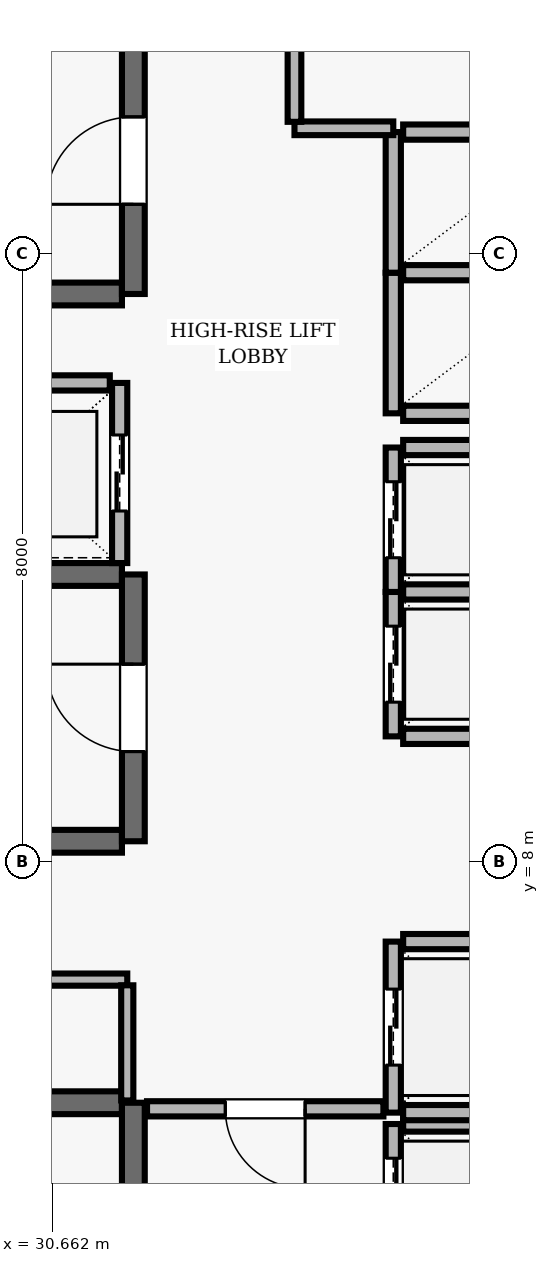
"""IFC4 building model, lengths in metres.
Left out: names, types, materials, properties, quantities, classifications, styles, units other than length and angle.
Written with IfcOpenShell. Run it as: python <this file> out.ifc"""

import sys

from ifc_helpers import new_model, si_unit, direction, frame, frame_2d, origin, place, context, subcontext, project, spatial, rectangle, extrude, element, fill, save


model = new_model("IFC4")
c1 = context("Model", 3, precision=1e-05, world=origin(), true_north=direction((0.0, 1.0)))
c2 = subcontext(c1, "Body", "Model", "MODEL_VIEW")
j1 = project(units=[si_unit("LENGTHUNIT", "METRE"), si_unit("PLANEANGLEUNIT", "RADIAN")], contexts=[c1])
p1 = place(None, origin())
s1 = spatial("IfcSite", under=j1, at=p1, CompositionType="ELEMENT")
p2 = place(p1, origin())
s2 = spatial("IfcBuilding", under=s1, at=p2, CompositionType="ELEMENT")
p3 = place(p2, frame((0.0, 0.0, 302.8)))
s3 = spatial("IfcBuildingStorey", under=s2, at=p3, CompositionType="ELEMENT", Elevation=302.8)
p4 = place(p3, frame((31.58, 4.83, 0.0), z_axis=(0.0, 0.0, 1.0), x_axis=(-1.0, 0.0, 0.0)))
e1 = element("IfcWall", 1, at=p4, inside=s3, PredefinedType="SHEAR", context=c2, shape_type="SweptSolid", body=[
    extrude(rectangle(XDim=8.36, YDim=0.3, at=frame_2d((4.18, 0.0))), origin(), (0.0, 0.0, 1.0), 3.64),
])
p5 = place(p3, frame((31.73, 0.96, 0.0), z_axis=(0.0, 0.0, 1.0), x_axis=(0.0, 1.0, 0.0)))
e2 = element("IfcWall", 2, at=p5, inside=s3, PredefinedType="SHEAR", context=c2, shape_type="SweptSolid", body=[
    extrude(rectangle(XDim=3.87, YDim=0.3, at=frame_2d((1.935, 0.0))), origin(), (0.0, 0.0, 1.0), 3.64),
])
p6 = place(p5, frame((1.54, 0.0, 0.0)))
e3 = element("IfcOpeningElement", 3, at=p6, cuts=e2, PredefinedType="OPENING", context=c2, shape_type="SweptSolid", body=[
    extrude(rectangle(XDim=1.15, YDim=2.15, at=frame_2d((0.575, 1.075))), frame((0.0, 0.16, 0.0), z_axis=(0.0, -1.0, 0.0), x_axis=(1.0, 0.0, 0.0)), (0.0, 0.0, 1.0), 0.32),
])
p7 = place(p3, frame((23.22, 15.47, 0.0), z_axis=(0.0, 0.0, 1.0), x_axis=(1.0, 0.0, 0.0)))
e4 = element("IfcWall", 4, at=p7, inside=s3, PredefinedType="SHEAR", context=c2, shape_type="SweptSolid", body=[
    extrude(rectangle(XDim=8.36, YDim=0.3, at=frame_2d((4.18, 0.0))), origin(), (0.0, 0.0, 1.0), 3.64),
])
p8 = place(p3, frame((31.73, 15.47, 0.0), z_axis=(0.0, 0.0, 1.0), x_axis=(0.0, 1.0, 0.0)))
e5 = element("IfcWall", 5, at=p8, inside=s3, PredefinedType="SHEAR", context=c2, shape_type="SweptSolid", body=[
    extrude(rectangle(XDim=3.51, YDim=0.3, at=frame_2d((1.755, 0.0))), origin(), (0.0, 0.0, 1.0), 3.64),
])
p9 = place(p8, frame((1.18, 0.0, 0.0)))
e6 = element("IfcOpeningElement", 6, at=p9, cuts=e5, PredefinedType="OPENING", context=c2, shape_type="SweptSolid", body=[
    extrude(rectangle(XDim=1.15, YDim=2.15, at=frame_2d((0.575, 1.075))), frame((0.0, 0.16, 0.0), z_axis=(0.0, -1.0, 0.0), x_axis=(1.0, 0.0, 0.0)), (0.0, 0.0, 1.0), 0.32),
])
for number, where, z_axis, x_axis in (
    (7, (31.58, 11.78, 0.0), (0.0, 0.0, 1.0), (-1.0, 0.0, 0.0)),
    (8, (23.22, 8.27, 0.0), (0.0, 0.0, 1.0), (1.0, 0.0, 0.0)),
):
    element("IfcWall", number, at=place(p3, frame(where, z_axis=z_axis, x_axis=x_axis)), inside=s3, PredefinedType="SHEAR", context=c2, shape_type="SweptSolid", body=[
        extrude(rectangle(XDim=8.36, YDim=0.3, at=frame_2d((4.18, 0.0))), origin(), (0.0, 0.0, 1.0), 3.64),
    ])
p10 = place(p3, frame((31.73, 8.27, 0.0), z_axis=(0.0, 0.0, 1.0), x_axis=(0.0, 1.0, 0.0)))
e9 = element("IfcWall", 9, at=p10, inside=s3, PredefinedType="SHEAR", context=c2, shape_type="SweptSolid", body=[
    extrude(rectangle(XDim=3.51, YDim=0.3, at=frame_2d((1.755, 0.0))), origin(), (0.0, 0.0, 1.0), 3.64),
])
p11 = place(p10, frame((1.18, 0.0, 0.0)))
e10 = element("IfcOpeningElement", 10, at=p11, cuts=e9, PredefinedType="OPENING", context=c2, shape_type="SweptSolid", body=[
    extrude(rectangle(XDim=1.15, YDim=2.15, at=frame_2d((0.575, 1.075))), frame((0.0, 0.16, 0.0), z_axis=(0.0, -1.0, 0.0), x_axis=(1.0, 0.0, 0.0)), (0.0, 0.0, 1.0), 0.32),
])
p12 = place(p3, frame((35.15, 4.55, 0.0), z_axis=(0.0, 0.0, 1.0), x_axis=(0.0, -1.0, 0.0)))
e11 = element("IfcWall", 11, at=p12, inside=s3, PredefinedType="SOLIDWALL", context=c2, shape_type="SweptSolid", body=[
    extrude(rectangle(XDim=2.1, YDim=0.2, at=frame_2d((1.05, 0.0))), origin(), (0.0, 0.0, 1.0), 3.64),
])
p13 = place(p12, frame((0.45, 0.0, 0.0)))
e12 = element("IfcOpeningElement", 12, at=p13, cuts=e11, PredefinedType="OPENING", context=c2, shape_type="SweptSolid", body=[
    extrude(rectangle(XDim=1.2, YDim=2.15, at=frame_2d((0.6, 1.075))), frame((0.0, 0.11, 0.0), z_axis=(0.0, -1.0, 0.0), x_axis=(1.0, 0.0, 0.0)), (0.0, 0.0, 1.0), 0.22),
])
p14 = place(p3, frame((37.42, 4.55, 0.0), z_axis=(0.0, 0.0, 1.0), x_axis=(-1.0, 0.0, 0.0)))
e13 = element("IfcWall", 13, at=p14, inside=s3, PredefinedType="SOLIDWALL", context=c2, shape_type="SweptSolid", body=[
    extrude(rectangle(XDim=2.14, YDim=0.2, at=frame_2d((1.07, 0.0))), origin(), (0.0, 0.0, 1.0), 3.64),
])
p15 = place(p3, frame((35.15, 6.95, 0.0), z_axis=(0.0, 0.0, 1.0), x_axis=(0.0, -1.0, 0.0)))
e14 = element("IfcWall", 14, at=p15, inside=s3, PredefinedType="SOLIDWALL", context=c2, shape_type="SweptSolid", body=[
    extrude(rectangle(XDim=2.25, YDim=0.2, at=frame_2d((1.125, 0.0))), origin(), (0.0, 0.0, 1.0), 3.64),
])
p16 = place(p15, frame((0.625, 0.0, 0.0)))
e15 = element("IfcOpeningElement", 15, at=p16, cuts=e14, PredefinedType="OPENING", context=c2, shape_type="SweptSolid", body=[
    extrude(rectangle(XDim=1.0, YDim=2.1, at=frame_2d((0.5, 1.05))), frame((0.0, 0.11, 0.0), z_axis=(0.0, -1.0, 0.0), x_axis=(1.0, 0.0, 0.0)), (0.0, 0.0, 1.0), 0.22),
])
for number, where, z_axis, x_axis in (
    (16, (35.28, 4.7, 0.0), (0.0, 0.0, 1.0), (1.0, 0.0, 0.0)),
    (17, (37.42, 6.95, 0.0), (0.0, 0.0, 1.0), (-1.0, 0.0, 0.0)),
):
    element("IfcWall", number, at=place(p3, frame(where, z_axis=z_axis, x_axis=x_axis)), inside=s3, PredefinedType="SOLIDWALL", context=c2, shape_type="SweptSolid", body=[
        extrude(rectangle(XDim=2.14, YDim=0.2, at=frame_2d((1.07, 0.0))), origin(), (0.0, 0.0, 1.0), 3.64),
    ])
p17 = place(p3, frame((35.15, 11.55, 0.0), z_axis=(0.0, 0.0, 1.0), x_axis=(0.0, -1.0, 0.0)))
e18 = element("IfcWall", 18, at=p17, inside=s3, PredefinedType="SOLIDWALL", context=c2, shape_type="SweptSolid", body=[
    extrude(rectangle(XDim=1.9, YDim=0.2, at=frame_2d((0.95, 0.0))), origin(), (0.0, 0.0, 1.0), 3.64),
])
p18 = place(p17, frame((0.45, 0.0, 0.0)))
e19 = element("IfcOpeningElement", 19, at=p18, cuts=e18, PredefinedType="OPENING", context=c2, shape_type="SweptSolid", body=[
    extrude(rectangle(XDim=1.0, YDim=2.1, at=frame_2d((0.5, 1.05))), frame((0.0, 0.11, 0.0), z_axis=(0.0, -1.0, 0.0), x_axis=(1.0, 0.0, 0.0)), (0.0, 0.0, 1.0), 0.22),
])
for number, where, z_axis, x_axis in (
    (20, (35.28, 9.65, 0.0), (0.0, 0.0, 1.0), (1.0, 0.0, 0.0)),
    (21, (37.42, 11.55, 0.0), (0.0, 0.0, 1.0), (-1.0, 0.0, 0.0)),
):
    element("IfcWall", number, at=place(p3, frame(where, z_axis=z_axis, x_axis=x_axis)), inside=s3, PredefinedType="SOLIDWALL", context=c2, shape_type="SweptSolid", body=[
        extrude(rectangle(XDim=2.14, YDim=0.2, at=frame_2d((1.07, 0.0))), origin(), (0.0, 0.0, 1.0), 3.64),
    ])
p19 = place(p3, frame((35.15, 13.45, 0.0), z_axis=(0.0, 0.0, 1.0), x_axis=(0.0, -1.0, 0.0)))
e22 = element("IfcWall", 22, at=p19, inside=s3, PredefinedType="SOLIDWALL", context=c2, shape_type="SweptSolid", body=[
    extrude(rectangle(XDim=1.9, YDim=0.2, at=frame_2d((0.95, 0.0))), origin(), (0.0, 0.0, 1.0), 3.64),
])
p20 = place(p19, frame((0.45, 0.0, 0.0)))
e23 = element("IfcOpeningElement", 23, at=p20, cuts=e22, PredefinedType="OPENING", context=c2, shape_type="SweptSolid", body=[
    extrude(rectangle(XDim=1.0, YDim=2.1, at=frame_2d((0.5, 1.05))), frame((0.0, 0.11, 0.0), z_axis=(0.0, -1.0, 0.0), x_axis=(1.0, 0.0, 0.0)), (0.0, 0.0, 1.0), 0.22),
])
p21 = place(p3, frame((37.42, 13.45, 0.0), z_axis=(0.0, 0.0, 1.0), x_axis=(-1.0, 0.0, 0.0)))
e24 = element("IfcWall", 24, at=p21, inside=s3, PredefinedType="SOLIDWALL", context=c2, shape_type="SweptSolid", body=[
    extrude(rectangle(XDim=2.14, YDim=0.2, at=frame_2d((1.07, 0.0))), origin(), (0.0, 0.0, 1.0), 3.64),
])
p22 = place(p3, frame((31.55, 11.93, 0.0), z_axis=(0.0, 0.0, 1.0), x_axis=(0.0, 1.0, 0.0)))
e25 = element("IfcWall", 25, at=p22, inside=s3, PredefinedType="SOLIDWALL", context=c2, shape_type="SweptSolid", body=[
    extrude(rectangle(XDim=2.37, YDim=0.2, at=frame_2d((1.185, 0.0))), origin(), (0.0, 0.0, 1.0), 3.64),
])
p23 = place(p22, frame((0.685, 0.0, 0.0)))
e26 = element("IfcOpeningElement", 26, at=p23, cuts=e25, PredefinedType="OPENING", context=c2, shape_type="SweptSolid", body=[
    extrude(rectangle(XDim=1.0, YDim=2.1, at=frame_2d((0.5, 1.05))), frame((0.0, 0.11, 0.0), z_axis=(0.0, -1.0, 0.0), x_axis=(1.0, 0.0, 0.0)), (0.0, 0.0, 1.0), 0.22),
])
p24 = place(p3, frame((31.42, 14.3, 0.0), z_axis=(0.0, 0.0, 1.0), x_axis=(-1.0, 0.0, 0.0)))
e27 = element("IfcWall", 27, at=p24, inside=s3, PredefinedType="SOLIDWALL", context=c2, shape_type="SweptSolid", body=[
    extrude(rectangle(XDim=2.44, YDim=0.2, at=frame_2d((1.22, 0.0))), origin(), (0.0, 0.0, 1.0), 3.64),
])
p25 = place(p3, frame((35.15, 15.75, 0.0), z_axis=(0.0, 0.0, 1.0), x_axis=(0.0, -1.0, 0.0)))
e28 = element("IfcWall", 28, at=p25, inside=s3, PredefinedType="SOLIDWALL", context=c2, shape_type="SweptSolid", body=[
    extrude(rectangle(XDim=1.85, YDim=0.2, at=frame_2d((0.925, 0.0))), origin(), (0.0, 0.0, 1.0), 3.64),
])
for number, where, z_axis, x_axis in (
    (29, (35.28, 13.9, 0.0), (0.0, 0.0, 1.0), (1.0, 0.0, 0.0)),
    (30, (37.42, 15.75, 0.0), (0.0, 0.0, 1.0), (-1.0, 0.0, 0.0)),
):
    element("IfcWall", number, at=place(p3, frame(where, z_axis=z_axis, x_axis=x_axis)), inside=s3, PredefinedType="SOLIDWALL", context=c2, shape_type="SweptSolid", body=[
        extrude(rectangle(XDim=2.14, YDim=0.2, at=frame_2d((1.07, 0.0))), origin(), (0.0, 0.0, 1.0), 3.64),
    ])
p26 = place(p3, frame((35.15, 17.6, 0.0), z_axis=(0.0, 0.0, 1.0), x_axis=(0.0, -1.0, 0.0)))
e31 = element("IfcWall", 31, at=p26, inside=s3, PredefinedType="SOLIDWALL", context=c2, shape_type="SweptSolid", body=[
    extrude(rectangle(XDim=1.85, YDim=0.2, at=frame_2d((0.925, 0.0))), origin(), (0.0, 0.0, 1.0), 3.64),
])
p27 = place(p3, frame((37.42, 17.6, 0.0), z_axis=(0.0, 0.0, 1.0), x_axis=(-1.0, 0.0, 0.0)))
e32 = element("IfcWall", 32, at=p27, inside=s3, PredefinedType="SOLIDWALL", context=c2, shape_type="SweptSolid", body=[
    extrude(rectangle(XDim=2.14, YDim=0.2, at=frame_2d((1.07, 0.0))), origin(), (0.0, 0.0, 1.0), 3.64),
])
p28 = place(p3, frame((28.55, 6.45, 0.0), z_axis=(0.0, 0.0, 1.0), x_axis=(1.0, 0.0, 0.0)))
e33 = element("IfcWall", 33, at=p28, inside=s3, PredefinedType="PARTITIONING", context=c2, shape_type="SweptSolid", body=[
    extrude(rectangle(XDim=3.1, YDim=0.16, at=frame_2d((1.55, 0.0))), origin(), (0.0, 0.0, 1.0), 3.64),
])
p29 = place(p28, frame((1.11, 0.0, 0.0)))
e34 = element("IfcOpeningElement", 34, at=p29, cuts=e33, PredefinedType="OPENING", context=c2, shape_type="SweptSolid", body=[
    extrude(rectangle(XDim=0.88, YDim=2.1, at=frame_2d((0.44, 1.05))), frame((0.0, 0.09, 0.0), z_axis=(0.0, -1.0, 0.0), x_axis=(1.0, 0.0, 0.0)), (0.0, 0.0, 1.0), 0.18),
])
p30 = place(p3, frame((33.85, 17.65, 0.0), z_axis=(0.0, 0.0, 1.0), x_axis=(1.0, 0.0, 0.0)))
e35 = element("IfcWall", 35, at=p30, inside=s3, PredefinedType="PARTITIONING", context=c2, shape_type="SweptSolid", body=[
    extrude(rectangle(XDim=1.3, YDim=0.18, at=frame_2d((0.65, 0.0))), origin(), (0.0, 0.0, 1.0), 3.64),
])
p31 = place(p3, frame((35.02, 4.75, 0.0), z_axis=(0.0, 0.0, 1.0), x_axis=(-1.0, 0.0, 0.0)))
e36 = element("IfcWall", 36, at=p31, inside=s3, PredefinedType="SOLIDWALL", context=c2, shape_type="SweptSolid", body=[
    extrude(rectangle(XDim=3.11, YDim=0.2, at=frame_2d((1.555, 0.0))), origin(), (0.0, 0.0, 1.0), 3.64),
])
p32 = place(p31, frame((1.03, 0.0, 0.0)))
e37 = element("IfcOpeningElement", 37, at=p32, cuts=e36, PredefinedType="OPENING", context=c2, shape_type="SweptSolid", body=[
    extrude(rectangle(XDim=1.05, YDim=2.15, at=frame_2d((0.525, 1.075))), frame((0.0, 0.11, 0.0), z_axis=(0.0, -1.0, 0.0), x_axis=(1.0, 0.0, 0.0)), (0.0, 0.0, 1.0), 0.22),
])
p33 = place(p3, frame((31.65, 4.86, 0.0), z_axis=(0.0, 0.0, 1.0), x_axis=(0.0, 1.0, 0.0)))
e38 = element("IfcWall", 38, at=p33, inside=s3, PredefinedType="PARTITIONING", context=c2, shape_type="SweptSolid", body=[
    extrude(rectangle(XDim=1.515, YDim=0.16, at=frame_2d((0.757, 0.0))), origin(), (0.0, 0.0, 1.0), 3.64),
])
p34 = place(p3, frame((33.85, 17.735, 0.0), z_axis=(0.0, 0.0, 1.0), x_axis=(0.0, 1.0, 0.0)))
e39 = element("IfcWall", 39, at=p34, inside=s3, PredefinedType="PARTITIONING", context=c2, shape_type="SweptSolid", body=[
    extrude(rectangle(XDim=6.03, YDim=0.18, at=frame_2d((3.015, 0.0))), origin(), (0.0, 0.0, 1.0), 3.64),
])
p35 = place(p34, frame((2.54, 0.0, 0.0)))
e40 = element("IfcOpeningElement", 40, at=p35, cuts=e39, PredefinedType="OPENING", context=c2, shape_type="SweptSolid", body=[
    extrude(rectangle(XDim=0.95, YDim=2.1, at=frame_2d((0.475, 1.05))), frame((0.0, 0.1, 0.0), z_axis=(0.0, -1.0, 0.0), x_axis=(1.0, 0.0, 0.0)), (0.0, 0.0, 1.0), 0.2),
])
p36 = place(p9, origin())
e41 = element("IfcDoor", 41, at=p36, inside=s3, OperationType="SINGLE_SWING_LEFT", PredefinedType="DOOR", context=c2, shape_type="SweptSolid", body=[
    extrude(rectangle(XDim=1.15, YDim=2.15, at=frame_2d((0.575, 1.075))), frame((0.0, 0.025, 0.0), z_axis=(0.0, -1.0, 0.0), x_axis=(1.0, 0.0, 0.0)), (0.0, 0.0, 1.0), 0.05),
])
fill(e6, e41)
p37 = place(p11, origin())
e42 = element("IfcDoor", 42, at=p37, inside=s3, OperationType="SINGLE_SWING_RIGHT", PredefinedType="DOOR", context=c2, shape_type="SweptSolid", body=[
    extrude(rectangle(XDim=1.15, YDim=2.15, at=frame_2d((0.575, 1.075))), frame((0.0, 0.025, 0.0), z_axis=(0.0, -1.0, 0.0), x_axis=(1.0, 0.0, 0.0)), (0.0, 0.0, 1.0), 0.05),
])
fill(e10, e42)
p38 = place(p13, origin())
e43 = element("IfcDoor", 43, at=p38, inside=s3, OperationType="DOUBLE_DOOR_SLIDING", PredefinedType="DOOR", context=c2, shape_type="SweptSolid", body=[
    extrude(rectangle(XDim=1.2, YDim=2.15, at=frame_2d((0.6, 1.075))), frame((0.0, 0.025, 0.0), z_axis=(0.0, -1.0, 0.0), x_axis=(1.0, 0.0, 0.0)), (0.0, 0.0, 1.0), 0.05),
])
fill(e12, e43)
p39 = place(p16, origin())
e44 = element("IfcDoor", 44, at=p39, inside=s3, OperationType="DOUBLE_DOOR_SLIDING", PredefinedType="DOOR", context=c2, shape_type="SweptSolid", body=[
    extrude(rectangle(XDim=1.0, YDim=2.1, at=frame_2d((0.5, 1.05))), frame((0.0, 0.025, 0.0), z_axis=(0.0, -1.0, 0.0), x_axis=(1.0, 0.0, 0.0)), (0.0, 0.0, 1.0), 0.05),
])
fill(e15, e44)
p40 = place(p18, origin())
e45 = element("IfcDoor", 45, at=p40, inside=s3, OperationType="DOUBLE_DOOR_SLIDING", PredefinedType="DOOR", context=c2, shape_type="SweptSolid", body=[
    extrude(rectangle(XDim=1.0, YDim=2.1, at=frame_2d((0.5, 1.05))), frame((0.0, 0.025, 0.0), z_axis=(0.0, -1.0, 0.0), x_axis=(1.0, 0.0, 0.0)), (0.0, 0.0, 1.0), 0.05),
])
fill(e19, e45)
p41 = place(p20, origin())
e46 = element("IfcDoor", 46, at=p41, inside=s3, OperationType="DOUBLE_DOOR_SLIDING", PredefinedType="DOOR", context=c2, shape_type="SweptSolid", body=[
    extrude(rectangle(XDim=1.0, YDim=2.1, at=frame_2d((0.5, 1.05))), frame((0.0, 0.025, 0.0), z_axis=(0.0, -1.0, 0.0), x_axis=(1.0, 0.0, 0.0)), (0.0, 0.0, 1.0), 0.05),
])
fill(e23, e46)
p42 = place(p23, origin())
e47 = element("IfcDoor", 47, at=p42, inside=s3, OperationType="DOUBLE_DOOR_SLIDING", PredefinedType="DOOR", context=c2, shape_type="SweptSolid", body=[
    extrude(rectangle(XDim=1.0, YDim=2.1, at=frame_2d((0.5, 1.05))), frame((0.0, 0.025, 0.0), z_axis=(0.0, -1.0, 0.0), x_axis=(1.0, 0.0, 0.0)), (0.0, 0.0, 1.0), 0.05),
])
fill(e26, e47)
p43 = place(p32, origin())
e48 = element("IfcDoor", 48, at=p43, inside=s3, OperationType="SINGLE_SWING_LEFT", PredefinedType="DOOR", context=c2, shape_type="SweptSolid", body=[
    extrude(rectangle(XDim=1.05, YDim=2.15, at=frame_2d((0.525, 1.075))), frame((0.0, 0.025, 0.0), z_axis=(0.0, -1.0, 0.0), x_axis=(1.0, 0.0, 0.0)), (0.0, 0.0, 1.0), 0.05),
])
fill(e37, e48)
save(model, sys.argv[1])
